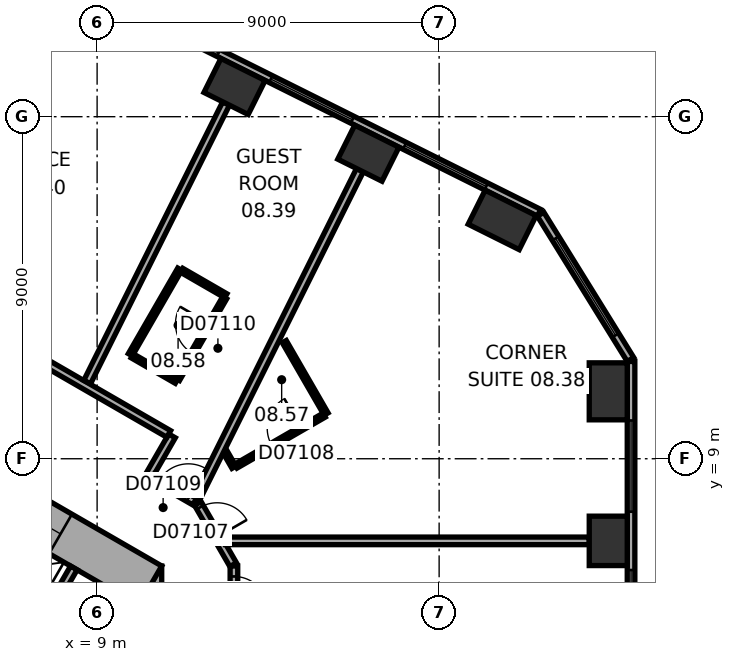
"""IFC4 building model, lengths in metres.
Left out: names, types, materials, properties, quantities, classifications, styles, units other than length and angle.
Written with IfcOpenShell. Run it as: python <this file> out.ifc"""

import sys

from ifc_helpers import new_model, si_unit, direction, frame, frame_2d, origin, origin_2d, place, context, subcontext, project, spatial, rectangle, extrude, element, fill, save


model = new_model("IFC4")
c1 = context("Model", 3, precision=1e-05, world=origin(), true_north=direction((0.0, 1.0)))
c2 = subcontext(c1, "Body", "Model", "MODEL_VIEW")
j1 = project(units=[si_unit("LENGTHUNIT", "METRE"), si_unit("PLANEANGLEUNIT", "RADIAN")], contexts=[c1])
p1 = place(None, origin())
s1 = spatial("IfcSite", under=j1, at=p1, CompositionType="ELEMENT")
p2 = place(p1, origin())
s2 = spatial("IfcBuilding", under=s1, at=p2, CompositionType="ELEMENT")
p3 = place(p2, frame((0.0, 0.0, 47.3)))
s3 = spatial("IfcBuildingStorey", under=s2, at=p3, CompositionType="ELEMENT", Elevation=47.3)
p4 = place(p3, frame((22.45, 6.839, 0.0), z_axis=(0.0, 0.0, 1.0), x_axis=(0.0, 1.0, 0.0)))
e1 = element("IfcColumn", 1, at=p4, inside=s3, PredefinedType="COLUMN", context=c2, shape_type="SweptSolid", body=[
    extrude(rectangle(XDim=1.3, YDim=1.0, at=origin_2d()), origin(), (0.0, 0.0, 1.0), 3.3),
])
for number, where, z_axis, x_axis in (
    (2, (22.45, 10.774, 0.0), (0.0, 0.0, 1.0), (0.0, 1.0, 0.0)),
    (3, (19.659, 15.284, 0.0), (0.0, 0.0, 1.0), (-0.895, 0.446, 0.0)),
):
    element("IfcColumn", number, at=place(p3, frame(where, z_axis=z_axis, x_axis=x_axis)), inside=s3, PredefinedType="COLUMN", context=c2, shape_type="SweptSolid", body=[
        extrude(rectangle(XDim=1.5, YDim=1.0, at=origin_2d()), origin(), (0.0, 0.0, 1.0), 3.3),
    ])
for number, where, z_axis, x_axis in (
    (4, (16.138, 17.04, 0.0), (0.0, 0.0, 1.0), (-0.895, 0.446, 0.0)),
    (5, (12.616, 18.795, 0.0), (0.0, 0.0, 1.0), (-0.895, 0.446, 0.0)),
):
    element("IfcColumn", number, at=place(p3, frame(where, z_axis=z_axis, x_axis=x_axis)), inside=s3, PredefinedType="COLUMN", context=c2, shape_type="SweptSolid", body=[
        extrude(rectangle(XDim=1.3, YDim=1.0, at=origin_2d()), origin(), (0.0, 0.0, 1.0), 3.3),
    ])
p5 = place(p3, frame((10.1, -6.177, 0.0), z_axis=(0.0, 0.0, 1.0), x_axis=(0.0, 1.0, 0.0)))
e6 = element("IfcWall", 6, at=p5, inside=s3, PredefinedType="SHEAR", context=c2, shape_type="SweptSolid", body=[
    extrude(rectangle(XDim=12.355, YDim=1.2, at=frame_2d((6.177, 0.0))), origin(), (0.0, 0.0, 1.0), 3.3),
])
p6 = place(p5, frame((6.378, 0.0, 0.0)))
e7 = element("IfcOpeningElement", 7, at=p6, cuts=e6, PredefinedType="OPENING", context=c2, shape_type="SweptSolid", body=[
    extrude(rectangle(XDim=1.5, YDim=2.1, at=frame_2d((0.75, 1.05))), frame((0.0, 0.61, 0.0), z_axis=(0.0, -1.0, 0.0), x_axis=(1.0, 0.0, 0.0)), (0.0, 0.0, 1.0), 1.22),
])
p7 = place(p5, frame((1.828, 0.0, 0.0)))
e8 = element("IfcOpeningElement", 8, at=p7, cuts=e6, PredefinedType="OPENING", context=c2, shape_type="SweptSolid", body=[
    extrude(rectangle(XDim=1.1, YDim=2.1, at=frame_2d((0.55, 1.05))), frame((0.0, 0.61, 0.0), z_axis=(0.0, -1.0, 0.0), x_axis=(1.0, 0.0, 0.0)), (0.0, 0.0, 1.0), 1.22),
])
p8 = place(p5, frame((4.427, 0.0, 0.0)))
e9 = element("IfcOpeningElement", 9, at=p8, cuts=e6, PredefinedType="OPENING", context=c2, shape_type="SweptSolid", body=[
    extrude(rectangle(XDim=1.1, YDim=2.1, at=frame_2d((0.55, 1.05))), frame((0.0, 0.61, 0.0), z_axis=(0.0, -1.0, 0.0), x_axis=(1.0, 0.0, 0.0)), (0.0, 0.0, 1.0), 1.22),
])
p9 = place(p3, frame((10.4, 5.658, 0.0), z_axis=(0.0, 0.0, 1.0), x_axis=(-0.866021384402, 0.500006961711, 0.0)))
e10 = element("IfcWall", 10, at=p9, inside=s3, PredefinedType="SHEAR", context=c2, shape_type="SweptSolid", body=[
    extrude(rectangle(XDim=12.355, YDim=1.2, at=frame_2d((6.178, 0.0))), origin(), (0.0, 0.0, 1.0), 3.3),
])
p10 = place(p9, frame((2.728, 0.0, 0.0)))
e11 = element("IfcOpeningElement", 11, at=p10, cuts=e10, PredefinedType="OPENING", context=c2, shape_type="SweptSolid", body=[
    extrude(rectangle(XDim=1.1, YDim=2.1, at=frame_2d((0.55, 1.05))), frame((0.0, 0.61, 0.0), z_axis=(0.0, -1.0, 0.0), x_axis=(1.0, 0.0, 0.0)), (0.0, 0.0, 1.0), 1.22),
])
p11 = place(p9, frame((5.328, 0.0, 0.0)))
e12 = element("IfcOpeningElement", 12, at=p11, cuts=e10, PredefinedType="OPENING", context=c2, shape_type="SweptSolid", body=[
    extrude(rectangle(XDim=1.1, YDim=2.1, at=frame_2d((0.55, 1.05))), frame((0.0, 0.61, 0.0), z_axis=(0.0, -1.0, 0.0), x_axis=(1.0, 0.0, 0.0)), (0.0, 0.0, 1.0), 1.22),
])
p12 = place(p9, frame((7.928, 0.0, 0.0)))
e13 = element("IfcOpeningElement", 13, at=p12, cuts=e10, PredefinedType="OPENING", context=c2, shape_type="SweptSolid", body=[
    extrude(rectangle(XDim=1.1, YDim=2.1, at=frame_2d((0.55, 1.05))), frame((0.0, 0.61, 0.0), z_axis=(0.0, -1.0, 0.0), x_axis=(1.0, 0.0, 0.0)), (0.0, 0.0, 1.0), 1.22),
])
p13 = place(p3, frame((23.05, -9.687, 0.0), z_axis=(0.0, 0.0, 1.0), x_axis=(0.0, 1.0, 0.0)))
e14 = element("IfcWall", 14, at=p13, inside=s3, PredefinedType="STANDARD", context=c2, shape_type="SweptSolid", body=[
    extrude(rectangle(XDim=21.246, YDim=0.2, at=frame_2d((10.623, 0.0))), origin(), (0.0, 0.0, 1.0), 3.3),
])
p14 = place(p13, frame((1.555, 0.0, 0.8)))
e15 = element("IfcOpeningElement", 15, at=p14, cuts=e14, PredefinedType="OPENING", context=c2, shape_type="SweptSolid", body=[
    extrude(rectangle(XDim=2.4, YDim=1.7, at=frame_2d((1.2, 0.85))), frame((0.0, 0.11, 0.0), z_axis=(0.0, -1.0, 0.0), x_axis=(1.0, 0.0, 0.0)), (0.0, 0.0, 1.0), 0.22),
])
p15 = place(p13, frame((5.489, 0.0, 0.8)))
e16 = element("IfcOpeningElement", 16, at=p15, cuts=e14, PredefinedType="OPENING", context=c2, shape_type="SweptSolid", body=[
    extrude(rectangle(XDim=2.4, YDim=1.7, at=frame_2d((1.2, 0.85))), frame((0.0, 0.11, 0.0), z_axis=(0.0, -1.0, 0.0), x_axis=(1.0, 0.0, 0.0)), (0.0, 0.0, 1.0), 0.22),
])
p16 = place(p13, frame((9.424, 0.0, 0.8)))
e17 = element("IfcOpeningElement", 17, at=p16, cuts=e14, PredefinedType="OPENING", context=c2, shape_type="SweptSolid", body=[
    extrude(rectangle(XDim=2.4, YDim=1.7, at=frame_2d((1.2, 0.85))), frame((0.0, 0.11, 0.0), z_axis=(0.0, -1.0, 0.0), x_axis=(1.0, 0.0, 0.0)), (0.0, 0.0, 1.0), 0.22),
])
p17 = place(p13, frame((13.358, 0.0, 0.8)))
e18 = element("IfcOpeningElement", 18, at=p17, cuts=e14, PredefinedType="OPENING", context=c2, shape_type="SweptSolid", body=[
    extrude(rectangle(XDim=2.4, YDim=1.7, at=frame_2d((1.2, 0.85))), frame((0.0, 0.11, 0.0), z_axis=(0.0, -1.0, 0.0), x_axis=(1.0, 0.0, 0.0)), (0.0, 0.0, 1.0), 0.22),
])
p18 = place(p13, frame((17.293, 0.0, 0.8)))
e19 = element("IfcOpeningElement", 19, at=p18, cuts=e14, PredefinedType="OPENING", context=c2, shape_type="SweptSolid", body=[
    extrude(rectangle(XDim=2.4, YDim=1.7, at=frame_2d((1.2, 0.85))), frame((0.0, 0.11, 0.0), z_axis=(0.0, -1.0, 0.0), x_axis=(1.0, 0.0, 0.0)), (0.0, 0.0, 1.0), 0.22),
])
p19 = place(p3, frame((23.035, 11.612, 0.0), z_axis=(0.0, 0.0, 1.0), x_axis=(-0.526160091227, 0.850385535155, 0.0)))
e20 = element("IfcWall", 20, at=p19, inside=s3, PredefinedType="STANDARD", context=c2, shape_type="SweptSolid", body=[
    extrude(rectangle(XDim=4.494, YDim=0.2, at=frame_2d((2.247, 0.0))), origin(), (0.0, 0.0, 1.0), 3.3),
])
p20 = place(p19, frame((0.747, 0.0, 0.8)))
e21 = element("IfcOpeningElement", 21, at=p20, cuts=e20, PredefinedType="OPENING", context=c2, shape_type="SweptSolid", body=[
    extrude(rectangle(XDim=3.0, YDim=1.7, at=frame_2d((1.5, 0.85))), frame((0.0, 0.11, 0.0), z_axis=(0.0, -1.0, 0.0), x_axis=(1.0, 0.0, 0.0)), (0.0, 0.0, 1.0), 0.22),
])
p21 = place(p3, frame((20.63, 15.47, 0.0), z_axis=(0.0, 0.0, 1.0), x_axis=(-0.894934518609, 0.446197498203, 0.0)))
e22 = element("IfcWall", 22, at=p21, inside=s3, PredefinedType="STANDARD", context=c2, shape_type="SweptSolid", body=[
    extrude(rectangle(XDim=21.246, YDim=0.2, at=frame_2d((10.623, 0.0))), origin(), (0.0, 0.0, 1.0), 3.3),
])
p22 = place(p21, frame((1.553, 0.0, 0.8)))
e23 = element("IfcOpeningElement", 23, at=p22, cuts=e22, PredefinedType="OPENING", context=c2, shape_type="SweptSolid", body=[
    extrude(rectangle(XDim=2.4, YDim=1.7, at=frame_2d((1.2, 0.85))), frame((0.0, 0.11, 0.0), z_axis=(0.0, -1.0, 0.0), x_axis=(1.0, 0.0, 0.0)), (0.0, 0.0, 1.0), 0.22),
])
p23 = place(p21, frame((5.488, 0.0, 0.8)))
e24 = element("IfcOpeningElement", 24, at=p23, cuts=e22, PredefinedType="OPENING", context=c2, shape_type="SweptSolid", body=[
    extrude(rectangle(XDim=2.4, YDim=1.7, at=frame_2d((1.2, 0.85))), frame((0.0, 0.11, 0.0), z_axis=(0.0, -1.0, 0.0), x_axis=(1.0, 0.0, 0.0)), (0.0, 0.0, 1.0), 0.22),
])
p24 = place(p21, frame((9.422, 0.0, 0.8)))
e25 = element("IfcOpeningElement", 25, at=p24, cuts=e22, PredefinedType="OPENING", context=c2, shape_type="SweptSolid", body=[
    extrude(rectangle(XDim=2.4, YDim=1.7, at=frame_2d((1.2, 0.85))), frame((0.0, 0.11, 0.0), z_axis=(0.0, -1.0, 0.0), x_axis=(1.0, 0.0, 0.0)), (0.0, 0.0, 1.0), 0.22),
])
p25 = place(p21, frame((13.357, 0.0, 0.8)))
e26 = element("IfcOpeningElement", 26, at=p25, cuts=e22, PredefinedType="OPENING", context=c2, shape_type="SweptSolid", body=[
    extrude(rectangle(XDim=2.4, YDim=1.7, at=frame_2d((1.2, 0.85))), frame((0.0, 0.11, 0.0), z_axis=(0.0, -1.0, 0.0), x_axis=(1.0, 0.0, 0.0)), (0.0, 0.0, 1.0), 0.22),
])
p26 = place(p21, frame((17.292, 0.0, 0.8)))
e27 = element("IfcOpeningElement", 27, at=p26, cuts=e22, PredefinedType="OPENING", context=c2, shape_type="SweptSolid", body=[
    extrude(rectangle(XDim=2.4, YDim=1.7, at=frame_2d((1.2, 0.85))), frame((0.0, 0.11, 0.0), z_axis=(0.0, -1.0, 0.0), x_axis=(1.0, 0.0, 0.0)), (0.0, 0.0, 1.0), 0.22),
])
p27 = place(p3, frame((7.287, 4.222, 0.0), z_axis=(0.0, 0.0, 1.0), x_axis=(0.499946605688, 0.86605622881, 0.0)))
e28 = element("IfcWall", 28, at=p27, inside=s3, PredefinedType="PARTITIONING", context=c2, shape_type="SweptSolid", body=[
    extrude(rectangle(XDim=2.2, YDim=0.2, at=frame_2d((1.1, 0.0))), origin(), (0.0, 0.0, 1.0), 3.05),
])
p28 = place(p3, frame((9.875, 11.736, 0.0), z_axis=(0.0, 0.0, 1.0), x_axis=(0.499936506574, 0.866062058628, 0.0)))
e29 = element("IfcWall", 29, at=p28, inside=s3, PredefinedType="PARTITIONING", context=c2, shape_type="SweptSolid", body=[
    extrude(rectangle(XDim=2.6, YDim=0.12, at=frame_2d((1.3, 0.0))), origin(), (0.0, 0.0, 1.0), 3.05),
])
p29 = place(p3, frame((10.371, 8.561, 0.0), z_axis=(0.0, 0.0, 1.0), x_axis=(0.499986357472, 0.866033280158, 0.0)))
e30 = element("IfcWall", 30, at=p29, inside=s3, PredefinedType="PARTITIONING", context=c2, shape_type="SweptSolid", body=[
    extrude(rectangle(XDim=1.201, YDim=0.2, at=frame_2d((0.601, 0.0))), origin(), (0.0, 0.0, 1.0), 3.05),
])
p30 = place(p3, frame((10.885, 9.652, 0.0), z_axis=(0.0, 0.0, 1.0), x_axis=(-0.866033868542, 0.499985338323, 0.0)))
e31 = element("IfcWall", 31, at=p30, inside=s3, PredefinedType="PARTITIONING", context=c2, shape_type="SweptSolid", body=[
    extrude(rectangle(XDim=8.602, YDim=0.2, at=frame_2d((4.301, 0.0))), origin(), (0.0, 0.0, 1.0), 3.05),
])
p31 = place(p30, frame((5.069, 0.0, 0.0)))
e32 = element("IfcOpeningElement", 32, at=p31, cuts=e31, PredefinedType="OPENING", context=c2, shape_type="SweptSolid", body=[
    extrude(rectangle(XDim=1.0, YDim=2.1, at=frame_2d((0.5, 1.05))), frame((0.0, 0.11, 0.0), z_axis=(0.0, -1.0, 0.0), x_axis=(1.0, 0.0, 0.0)), (0.0, 0.0, 1.0), 0.22),
])
for number, where, z_axis, x_axis in (
    (33, (11.087, 11.036, 0.0), (0.0, 0.0, 1.0), (-0.866, 0.5, 0.0)),
    (34, (11.226, 13.958, 0.0), (0.0, 0.0, 1.0), (0.866, -0.5, 0.0)),
):
    element("IfcWall", number, at=place(p3, frame(where, z_axis=z_axis, x_axis=x_axis)), inside=s3, PredefinedType="PARTITIONING", context=c2, shape_type="SweptSolid", body=[
        extrude(rectangle(XDim=1.34, YDim=0.12, at=frame_2d((0.67, 0.0))), origin(), (0.0, 0.0, 1.0), 3.05),
    ])
p32 = place(p3, frame((11.566, 7.871, 0.0), z_axis=(0.0, 0.0, 1.0), x_axis=(-0.866004557827, 0.500036104519, 0.0)))
e35 = element("IfcWall", 35, at=p32, inside=s3, PredefinedType="PARTITIONING", context=c2, shape_type="SweptSolid", body=[
    extrude(rectangle(XDim=1.28, YDim=0.2, at=frame_2d((0.64, 0.0))), origin(), (0.0, 0.0, 1.0), 3.05),
])
p33 = place(p32, frame((0.19, 0.0, 0.0)))
e36 = element("IfcOpeningElement", 36, at=p33, cuts=e35, PredefinedType="OPENING", context=c2, shape_type="SweptSolid", body=[
    extrude(rectangle(XDim=0.9, YDim=2.1, at=frame_2d((0.45, 1.05))), frame((0.0, 0.11, 0.0), z_axis=(0.0, -1.0, 0.0), x_axis=(1.0, 0.0, 0.0)), (0.0, 0.0, 1.0), 0.22),
])
p34 = place(p3, frame((12.357, 13.236, 0.0), z_axis=(0.0, 0.0, 1.0), x_axis=(-0.50000366821, -0.866023285932, 0.0)))
e37 = element("IfcWall", 37, at=p34, inside=s3, PredefinedType="PARTITIONING", context=c2, shape_type="SweptSolid", body=[
    extrude(rectangle(XDim=2.48, YDim=0.12, at=frame_2d((1.24, 0.0))), origin(), (0.0, 0.0, 1.0), 3.05),
])
p35 = place(p34, frame((0.79, 0.0, 0.0)))
e38 = element("IfcOpeningElement", 38, at=p35, cuts=e37, PredefinedType="OPENING", context=c2, shape_type="SweptSolid", body=[
    extrude(rectangle(XDim=0.9, YDim=2.1, at=frame_2d((0.45, 1.05))), frame((0.0, 0.07, 0.0), z_axis=(0.0, -1.0, 0.0), x_axis=(1.0, 0.0, 0.0)), (0.0, 0.0, 1.0), 0.14),
])
p36 = place(p3, frame((12.393, 18.348, 0.0), z_axis=(0.0, 0.0, 1.0), x_axis=(-0.446176022699, -0.894945225569, 0.0)))
e39 = element("IfcWall", 39, at=p36, inside=s3, PredefinedType="PARTITIONING", context=c2, shape_type="SweptSolid", body=[
    extrude(rectangle(XDim=8.191, YDim=0.2, at=frame_2d((4.095, 0.0))), origin(), (0.0, 0.0, 1.0), 2.6),
])
p37 = place(p3, frame((12.58, 6.212, 0.0), z_axis=(0.0, 0.0, 1.0), x_axis=(-0.500063286585, 0.865988862174, 0.0)))
e40 = element("IfcWall", 40, at=p37, inside=s3, PredefinedType="PARTITIONING", context=c2, shape_type="SweptSolid", body=[
    extrude(rectangle(XDim=1.86, YDim=0.2, at=frame_2d((0.93, 0.0))), origin(), (0.0, 0.0, 1.0), 3.05),
])
p38 = place(p37, frame((0.842, 0.0, 0.0)))
e41 = element("IfcOpeningElement", 41, at=p38, cuts=e40, PredefinedType="OPENING", context=c2, shape_type="SweptSolid", body=[
    extrude(rectangle(XDim=0.9, YDim=2.1, at=frame_2d((0.45, 1.05))), frame((0.0, 0.11, 0.0), z_axis=(0.0, -1.0, 0.0), x_axis=(1.0, 0.0, 0.0)), (0.0, 0.0, 1.0), 0.22),
])
p39 = place(p3, frame((12.6, 3.004, 0.0), z_axis=(0.0, 0.0, 1.0), x_axis=(0.0, 1.0, 0.0)))
e42 = element("IfcWall", 42, at=p39, inside=s3, PredefinedType="PARTITIONING", context=c2, shape_type="SweptSolid", body=[
    extrude(rectangle(XDim=3.173, YDim=0.2, at=frame_2d((1.586, 0.0))), origin(), (0.0, 0.0, 1.0), 3.05),
])
p40 = place(p39, frame((1.998, 0.0, 0.0)))
e43 = element("IfcOpeningElement", 43, at=p40, cuts=e42, PredefinedType="OPENING", context=c2, shape_type="SweptSolid", body=[
    extrude(rectangle(XDim=0.9, YDim=2.1, at=frame_2d((0.45, 1.05))), frame((0.0, 0.11, 0.0), z_axis=(0.0, -1.0, 0.0), x_axis=(1.0, 0.0, 0.0)), (0.0, 0.0, 1.0), 0.22),
])
p41 = place(p3, frame((12.601, 8.776, 0.0), z_axis=(0.0, 0.0, 1.0), x_axis=(-0.500166486798, 0.865929261247, 0.0)))
e44 = element("IfcWall", 44, at=p41, inside=s3, PredefinedType="PARTITIONING", context=c2, shape_type="SweptSolid", body=[
    extrude(rectangle(XDim=0.476, YDim=0.12, at=frame_2d((0.238, 0.0))), origin(), (0.0, 0.0, 1.0), 3.05),
])
p42 = place(p3, frame((13.926, 12.081, 0.0), z_axis=(0.0, 0.0, 1.0), x_axis=(0.499994660107, -0.866028486751, 0.0)))
e45 = element("IfcWall", 45, at=p42, inside=s3, PredefinedType="PARTITIONING", context=c2, shape_type="SweptSolid", body=[
    extrude(rectangle(XDim=2.2, YDim=0.12, at=frame_2d((1.1, 0.0))), origin(), (0.0, 0.0, 1.0), 3.05),
])
p43 = place(p3, frame((14.974, 10.146, 0.0), z_axis=(0.0, 0.0, 1.0), x_axis=(-0.86599746015, -0.500048396672, 0.0)))
e46 = element("IfcWall", 46, at=p43, inside=s3, PredefinedType="PARTITIONING", context=c2, shape_type="SweptSolid", body=[
    extrude(rectangle(XDim=2.68, YDim=0.12, at=frame_2d((1.34, 0.0))), origin(), (0.0, 0.0, 1.0), 3.05),
])
p44 = place(p43, frame((0.69, 0.0, 0.0)))
e47 = element("IfcOpeningElement", 47, at=p44, cuts=e46, PredefinedType="OPENING", context=c2, shape_type="SweptSolid", body=[
    extrude(rectangle(XDim=0.9, YDim=2.1, at=frame_2d((0.45, 1.05))), frame((0.0, 0.07, 0.0), z_axis=(0.0, -1.0, 0.0), x_axis=(1.0, 0.0, 0.0)), (0.0, 0.0, 1.0), 0.14),
])
p45 = place(p3, frame((15.915, 16.592, 0.0), z_axis=(0.0, 0.0, 1.0), x_axis=(-0.446199736347, -0.894933402709, 0.0)))
e48 = element("IfcWall", 48, at=p45, inside=s3, PredefinedType="PARTITIONING", context=c2, shape_type="SweptSolid", body=[
    extrude(rectangle(XDim=9.635, YDim=0.2, at=frame_2d((4.817, 0.0))), origin(), (0.0, 0.0, 1.0), 3.05),
])
p46 = place(p3, frame((21.95, 6.839, 0.0), z_axis=(0.0, 0.0, 1.0), x_axis=(-1.0, 0.0, 0.0)))
e49 = element("IfcWall", 49, at=p46, inside=s3, PredefinedType="PARTITIONING", context=c2, shape_type="SweptSolid", body=[
    extrude(rectangle(XDim=9.572, YDim=0.2, at=frame_2d((4.786, 0.0))), origin(), (0.0, 0.0, 1.0), 3.05),
])
p47 = place(p17, origin())
e50 = element("IfcWindow", 50, at=p47, inside=s3, PartitioningType="SINGLE_PANEL", PredefinedType="WINDOW", context=c2, shape_type="SweptSolid", body=[
    extrude(rectangle(XDim=2.4, YDim=1.7, at=frame_2d((1.2, 0.85))), frame((0.0, 0.03, 0.0), z_axis=(0.0, -1.0, 0.0), x_axis=(1.0, 0.0, 0.0)), (0.0, 0.0, 1.0), 0.06),
])
fill(e18, e50)
p48 = place(p18, origin())
e51 = element("IfcWindow", 51, at=p48, inside=s3, PartitioningType="SINGLE_PANEL", PredefinedType="WINDOW", context=c2, shape_type="SweptSolid", body=[
    extrude(rectangle(XDim=2.4, YDim=1.7, at=frame_2d((1.2, 0.85))), frame((0.0, 0.03, 0.0), z_axis=(0.0, -1.0, 0.0), x_axis=(1.0, 0.0, 0.0)), (0.0, 0.0, 1.0), 0.06),
])
fill(e19, e51)
p49 = place(p20, origin())
e52 = element("IfcWindow", 52, at=p49, inside=s3, PartitioningType="SINGLE_PANEL", PredefinedType="WINDOW", context=c2, shape_type="SweptSolid", body=[
    extrude(rectangle(XDim=3.0, YDim=1.7, at=frame_2d((1.5, 0.85))), frame((0.0, 0.03, 0.0), z_axis=(0.0, -1.0, 0.0), x_axis=(1.0, 0.0, 0.0)), (0.0, 0.0, 1.0), 0.06),
])
fill(e21, e52)
p50 = place(p22, origin())
e53 = element("IfcWindow", 53, at=p50, inside=s3, PartitioningType="SINGLE_PANEL", PredefinedType="WINDOW", context=c2, shape_type="SweptSolid", body=[
    extrude(rectangle(XDim=2.4, YDim=1.7, at=frame_2d((1.2, 0.85))), frame((0.0, 0.03, 0.0), z_axis=(0.0, -1.0, 0.0), x_axis=(1.0, 0.0, 0.0)), (0.0, 0.0, 1.0), 0.06),
])
fill(e23, e53)
p51 = place(p23, origin())
e54 = element("IfcWindow", 54, at=p51, inside=s3, PartitioningType="SINGLE_PANEL", PredefinedType="WINDOW", context=c2, shape_type="SweptSolid", body=[
    extrude(rectangle(XDim=2.4, YDim=1.7, at=frame_2d((1.2, 0.85))), frame((0.0, 0.03, 0.0), z_axis=(0.0, -1.0, 0.0), x_axis=(1.0, 0.0, 0.0)), (0.0, 0.0, 1.0), 0.06),
])
fill(e24, e54)
p52 = place(p24, origin())
e55 = element("IfcWindow", 55, at=p52, inside=s3, PartitioningType="SINGLE_PANEL", PredefinedType="WINDOW", context=c2, shape_type="SweptSolid", body=[
    extrude(rectangle(XDim=2.4, YDim=1.7, at=frame_2d((1.2, 0.85))), frame((0.0, 0.03, 0.0), z_axis=(0.0, -1.0, 0.0), x_axis=(1.0, 0.0, 0.0)), (0.0, 0.0, 1.0), 0.06),
])
fill(e25, e55)
p53 = place(p10, origin())
e56 = element("IfcDoor", 56, at=p53, inside=s3, OperationType="DOUBLE_DOOR_SLIDING", PredefinedType="DOOR", context=c2, shape_type="SweptSolid", body=[
    extrude(rectangle(XDim=1.1, YDim=2.1, at=frame_2d((0.55, 1.05))), frame((0.0, 0.025, 0.0), z_axis=(0.0, -1.0, 0.0), x_axis=(1.0, 0.0, 0.0)), (0.0, 0.0, 1.0), 0.05),
])
fill(e11, e56)
p54 = place(p40, origin())
e57 = element("IfcDoor", 57, at=p54, inside=s3, OperationType="SINGLE_SWING_LEFT", PredefinedType="DOOR", context=c2, shape_type="SweptSolid", body=[
    extrude(rectangle(XDim=0.9, YDim=2.1, at=frame_2d((0.45, 1.05))), frame((0.0, 0.025, 0.0), z_axis=(0.0, -1.0, 0.0), x_axis=(1.0, 0.0, 0.0)), (0.0, 0.0, 1.0), 0.05),
])
fill(e43, e57)
p55 = place(p38, origin())
e58 = element("IfcDoor", 58, at=p55, inside=s3, OperationType="SINGLE_SWING_LEFT", PredefinedType="DOOR", context=c2, shape_type="SweptSolid", body=[
    extrude(rectangle(XDim=0.9, YDim=2.1, at=frame_2d((0.45, 1.05))), frame((0.0, 0.025, 0.0), z_axis=(0.0, -1.0, 0.0), x_axis=(1.0, 0.0, 0.0)), (0.0, 0.0, 1.0), 0.05),
])
fill(e41, e58)
p56 = place(p44, origin())
e59 = element("IfcDoor", 59, at=p56, inside=s3, OperationType="SINGLE_SWING_LEFT", PredefinedType="DOOR", context=c2, shape_type="SweptSolid", body=[
    extrude(rectangle(XDim=0.9, YDim=2.1, at=frame_2d((0.45, 1.05))), frame((0.0, 0.025, 0.0), z_axis=(0.0, -1.0, 0.0), x_axis=(1.0, 0.0, 0.0)), (0.0, 0.0, 1.0), 0.05),
])
fill(e47, e59)
p57 = place(p33, origin())
e60 = element("IfcDoor", 60, at=p57, inside=s3, OperationType="SINGLE_SWING_LEFT", PredefinedType="DOOR", context=c2, shape_type="SweptSolid", body=[
    extrude(rectangle(XDim=0.9, YDim=2.1, at=frame_2d((0.45, 1.05))), frame((0.0, 0.025, 0.0), z_axis=(0.0, -1.0, 0.0), x_axis=(1.0, 0.0, 0.0)), (0.0, 0.0, 1.0), 0.05),
])
fill(e36, e60)
p58 = place(p35, origin())
e61 = element("IfcDoor", 61, at=p58, inside=s3, OperationType="SINGLE_SWING_LEFT", PredefinedType="DOOR", context=c2, shape_type="SweptSolid", body=[
    extrude(rectangle(XDim=0.9, YDim=2.1, at=frame_2d((0.45, 1.05))), frame((0.0, 0.025, 0.0), z_axis=(0.0, -1.0, 0.0), x_axis=(1.0, 0.0, 0.0)), (0.0, 0.0, 1.0), 0.05),
])
fill(e38, e61)
save(model, sys.argv[1])
